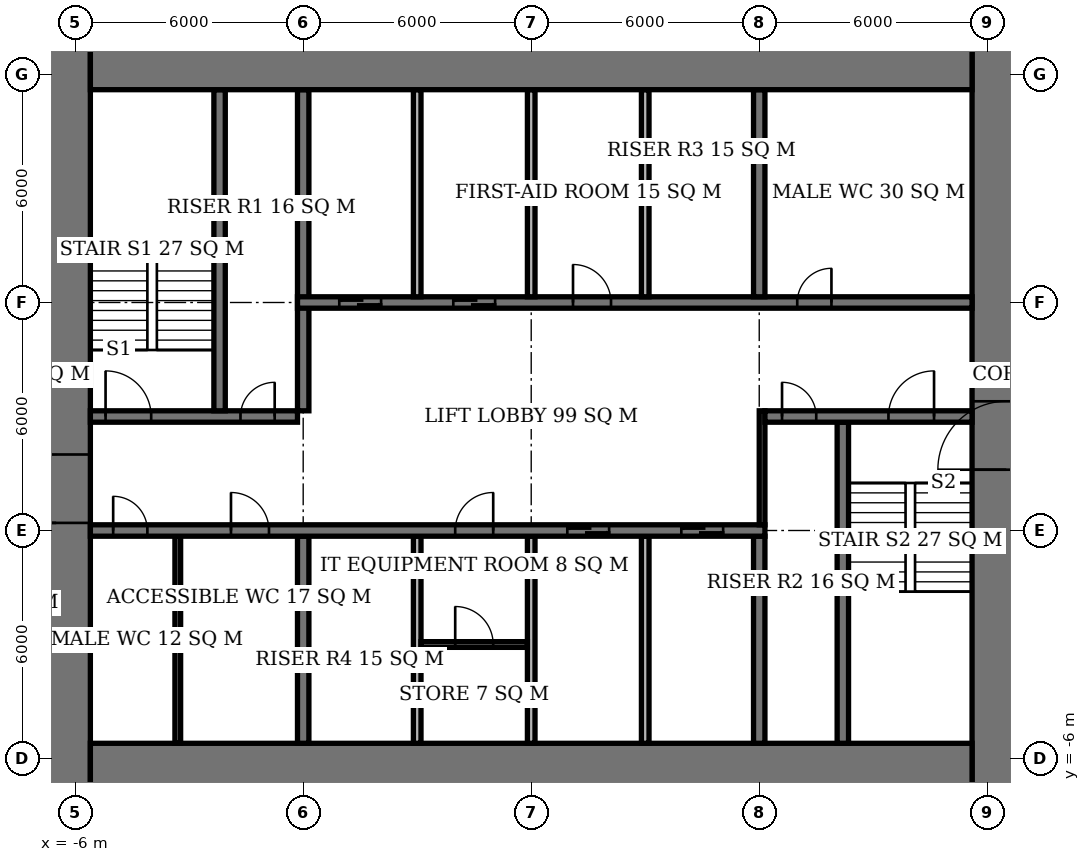
"""IFC4 building model, lengths in metres.
Left out: names, types, materials, properties, quantities, classifications, styles, units other than length and angle.
Written with IfcOpenShell. Run it as: python <this file> out.ifc"""

import sys

from ifc_helpers import new_model, si_unit, direction, frame, frame_2d, origin, place, context, subcontext, project, spatial, rectangle, extrude, element, fill, save


model = new_model("IFC4")
c1 = context("Model", 3, precision=1e-05, world=origin(), true_north=direction((0.0, 1.0)))
c2 = subcontext(c1, "Body", "Model", "MODEL_VIEW")
j1 = project(units=[si_unit("LENGTHUNIT", "METRE"), si_unit("PLANEANGLEUNIT", "RADIAN")], contexts=[c1])
p1 = place(None, origin())
s1 = spatial("IfcSite", under=j1, at=p1, CompositionType="ELEMENT")
p2 = place(p1, origin())
s2 = spatial("IfcBuilding", under=s1, at=p2, CompositionType="ELEMENT")
p3 = place(p2, frame((0.0, 0.0, 220.1)))
s3 = spatial("IfcBuildingStorey", under=s2, at=p3, CompositionType="ELEMENT", Elevation=220.1)
for number, where, z_axis, x_axis in (
    (1, (-5.6, -6.6, 0.0), (0.0, 0.0, 1.0), (1.0, 0.0, 0.0)),
    (2, (-5.6, 12.6, 0.0), (0.0, 0.0, 1.0), (1.0, 0.0, 0.0)),
):
    element("IfcWall", number, at=place(p3, frame(where, z_axis=z_axis, x_axis=x_axis)), inside=s3, PredefinedType="SHEAR", context=c2, shape_type="SweptSolid", body=[
        extrude(rectangle(XDim=23.2, YDim=2.0, at=frame_2d((11.6, 0.0))), origin(), (0.0, 0.0, 1.0), 3.9),
    ])
p4 = place(p3, frame((-6.5, -7.6, 0.0), z_axis=(0.0, 0.0, 1.0), x_axis=(0.0, 1.0, 0.0)))
e3 = element("IfcWall", 3, at=p4, inside=s3, PredefinedType="SHEAR", context=c2, shape_type="SweptSolid", body=[
    extrude(rectangle(XDim=21.2, YDim=1.8, at=frame_2d((10.6, 0.0))), origin(), (0.0, 0.0, 1.0), 3.9),
])
p5 = place(p4, frame((7.8, 0.0, 0.0)))
e4 = element("IfcOpeningElement", 4, at=p5, cuts=e3, PredefinedType="OPENING", context=c2, shape_type="SweptSolid", body=[
    extrude(rectangle(XDim=1.8, YDim=2.4, at=frame_2d((0.9, 1.2))), frame((0.0, 0.91, 0.0), z_axis=(0.0, -1.0, 0.0), x_axis=(1.0, 0.0, 0.0)), (0.0, 0.0, 1.0), 1.82),
])
p6 = place(p3, frame((18.5, -7.6, 0.0), z_axis=(0.0, 0.0, 1.0), x_axis=(0.0, 1.0, 0.0)))
e5 = element("IfcWall", 5, at=p6, inside=s3, PredefinedType="SHEAR", context=c2, shape_type="SweptSolid", body=[
    extrude(rectangle(XDim=21.2, YDim=1.8, at=frame_2d((10.6, 0.0))), origin(), (0.0, 0.0, 1.0), 3.9),
])
p7 = place(p6, frame((9.2, 0.0, 0.0)))
e6 = element("IfcOpeningElement", 6, at=p7, cuts=e5, PredefinedType="OPENING", context=c2, shape_type="SweptSolid", body=[
    extrude(rectangle(XDim=1.8, YDim=2.4, at=frame_2d((0.9, 1.2))), frame((0.0, 0.91, 0.0), z_axis=(0.0, -1.0, 0.0), x_axis=(1.0, 0.0, 0.0)), (0.0, 0.0, 1.0), 1.82),
])
p8 = place(p3, frame((-5.6, 0.0, 0.0), z_axis=(0.0, 0.0, 1.0), x_axis=(1.0, 0.0, 0.0)))
e7 = element("IfcWall", 7, at=p8, inside=s3, PredefinedType="SHEAR", context=c2, shape_type="SweptSolid", body=[
    extrude(rectangle(XDim=17.75, YDim=0.3, at=frame_2d((8.875, 0.0))), origin(), (0.0, 0.0, 1.0), 3.9),
])
p9 = place(p8, frame((0.6, 0.0, 0.0)))
e8 = element("IfcOpeningElement", 8, at=p9, cuts=e7, PredefinedType="OPENING", context=c2, shape_type="SweptSolid", body=[
    extrude(rectangle(XDim=0.9, YDim=2.1, at=frame_2d((0.45, 1.05))), frame((0.0, 0.16, 0.0), z_axis=(0.0, -1.0, 0.0), x_axis=(1.0, 0.0, 0.0)), (0.0, 0.0, 1.0), 0.32),
])
p10 = place(p8, frame((3.7, 0.0, 0.0)))
e9 = element("IfcOpeningElement", 9, at=p10, cuts=e7, PredefinedType="OPENING", context=c2, shape_type="SweptSolid", body=[
    extrude(rectangle(XDim=1.0, YDim=2.1, at=frame_2d((0.5, 1.05))), frame((0.0, 0.16, 0.0), z_axis=(0.0, -1.0, 0.0), x_axis=(1.0, 0.0, 0.0)), (0.0, 0.0, 1.0), 0.32),
])
p11 = place(p8, frame((9.6, 0.0, 0.0)))
e10 = element("IfcOpeningElement", 10, at=p11, cuts=e7, PredefinedType="OPENING", context=c2, shape_type="SweptSolid", body=[
    extrude(rectangle(XDim=1.0, YDim=2.1, at=frame_2d((0.5, 1.05))), frame((0.0, 0.16, 0.0), z_axis=(0.0, -1.0, 0.0), x_axis=(1.0, 0.0, 0.0)), (0.0, 0.0, 1.0), 0.32),
])
p12 = place(p8, frame((12.55, 0.0, 0.0)))
e11 = element("IfcOpeningElement", 11, at=p12, cuts=e7, PredefinedType="OPENING", context=c2, shape_type="SweptSolid", body=[
    extrude(rectangle(XDim=1.1, YDim=2.1, at=frame_2d((0.55, 1.05))), frame((0.0, 0.16, 0.0), z_axis=(0.0, -1.0, 0.0), x_axis=(1.0, 0.0, 0.0)), (0.0, 0.0, 1.0), 0.32),
])
p13 = place(p8, frame((15.55, 0.0, 0.0)))
e12 = element("IfcOpeningElement", 12, at=p13, cuts=e7, PredefinedType="OPENING", context=c2, shape_type="SweptSolid", body=[
    extrude(rectangle(XDim=1.1, YDim=2.1, at=frame_2d((0.55, 1.05))), frame((0.0, 0.16, 0.0), z_axis=(0.0, -1.0, 0.0), x_axis=(1.0, 0.0, 0.0)), (0.0, 0.0, 1.0), 0.32),
])
p14 = place(p3, frame((-5.6, 3.0, 0.0), z_axis=(0.0, 0.0, 1.0), x_axis=(1.0, 0.0, 0.0)))
e13 = element("IfcWall", 13, at=p14, inside=s3, PredefinedType="SHEAR", context=c2, shape_type="SweptSolid", body=[
    extrude(rectangle(XDim=5.45, YDim=0.3, at=frame_2d((2.725, 0.0))), origin(), (0.0, 0.0, 1.0), 3.9),
])
p15 = place(p14, frame((0.4, 0.0, 0.0)))
e14 = element("IfcOpeningElement", 14, at=p15, cuts=e13, PredefinedType="OPENING", context=c2, shape_type="SweptSolid", body=[
    extrude(rectangle(XDim=1.2, YDim=2.1, at=frame_2d((0.6, 1.05))), frame((0.0, 0.16, 0.0), z_axis=(0.0, -1.0, 0.0), x_axis=(1.0, 0.0, 0.0)), (0.0, 0.0, 1.0), 0.32),
])
p16 = place(p14, frame((3.95, 0.0, 0.0)))
e15 = element("IfcOpeningElement", 15, at=p16, cuts=e13, PredefinedType="OPENING", context=c2, shape_type="SweptSolid", body=[
    extrude(rectangle(XDim=0.9, YDim=2.1, at=frame_2d((0.45, 1.05))), frame((0.0, 0.16, 0.0), z_axis=(0.0, -1.0, 0.0), x_axis=(1.0, 0.0, 0.0)), (0.0, 0.0, 1.0), 0.32),
])
p17 = place(p3, frame((12.15, 3.0, 0.0), z_axis=(0.0, 0.0, 1.0), x_axis=(1.0, 0.0, 0.0)))
e16 = element("IfcWall", 16, at=p17, inside=s3, PredefinedType="SHEAR", context=c2, shape_type="SweptSolid", body=[
    extrude(rectangle(XDim=5.45, YDim=0.3, at=frame_2d((2.725, 0.0))), origin(), (0.0, 0.0, 1.0), 3.9),
])
p18 = place(p17, frame((3.25, 0.0, 0.0)))
e17 = element("IfcOpeningElement", 17, at=p18, cuts=e16, PredefinedType="OPENING", context=c2, shape_type="SweptSolid", body=[
    extrude(rectangle(XDim=1.2, YDim=2.1, at=frame_2d((0.6, 1.05))), frame((0.0, 0.16, 0.0), z_axis=(0.0, -1.0, 0.0), x_axis=(1.0, 0.0, 0.0)), (0.0, 0.0, 1.0), 0.32),
])
p19 = place(p17, frame((0.45, 0.0, 0.0)))
e18 = element("IfcOpeningElement", 18, at=p19, cuts=e16, PredefinedType="OPENING", context=c2, shape_type="SweptSolid", body=[
    extrude(rectangle(XDim=0.9, YDim=2.1, at=frame_2d((0.45, 1.05))), frame((0.0, 0.16, 0.0), z_axis=(0.0, -1.0, 0.0), x_axis=(1.0, 0.0, 0.0)), (0.0, 0.0, 1.0), 0.32),
])
p20 = place(p3, frame((-0.15, 6.0, 0.0), z_axis=(0.0, 0.0, 1.0), x_axis=(1.0, 0.0, 0.0)))
e19 = element("IfcWall", 19, at=p20, inside=s3, PredefinedType="SHEAR", context=c2, shape_type="SweptSolid", body=[
    extrude(rectangle(XDim=17.75, YDim=0.3, at=frame_2d((8.875, 0.0))), origin(), (0.0, 0.0, 1.0), 3.9),
])
p21 = place(p20, frame((13.15, 0.0, 0.0)))
e20 = element("IfcOpeningElement", 20, at=p21, cuts=e19, PredefinedType="OPENING", context=c2, shape_type="SweptSolid", body=[
    extrude(rectangle(XDim=0.9, YDim=2.1, at=frame_2d((0.45, 1.05))), frame((0.0, 0.16, 0.0), z_axis=(0.0, -1.0, 0.0), x_axis=(1.0, 0.0, 0.0)), (0.0, 0.0, 1.0), 0.32),
])
p22 = place(p20, frame((7.25, 0.0, 0.0)))
e21 = element("IfcOpeningElement", 21, at=p22, cuts=e19, PredefinedType="OPENING", context=c2, shape_type="SweptSolid", body=[
    extrude(rectangle(XDim=1.0, YDim=2.1, at=frame_2d((0.5, 1.05))), frame((0.0, 0.16, 0.0), z_axis=(0.0, -1.0, 0.0), x_axis=(1.0, 0.0, 0.0)), (0.0, 0.0, 1.0), 0.32),
])
p23 = place(p20, frame((1.1, 0.0, 0.0)))
e22 = element("IfcOpeningElement", 22, at=p23, cuts=e19, PredefinedType="OPENING", context=c2, shape_type="SweptSolid", body=[
    extrude(rectangle(XDim=1.1, YDim=2.1, at=frame_2d((0.55, 1.05))), frame((0.0, 0.16, 0.0), z_axis=(0.0, -1.0, 0.0), x_axis=(1.0, 0.0, 0.0)), (0.0, 0.0, 1.0), 0.32),
])
p24 = place(p20, frame((4.1, 0.0, 0.0)))
e23 = element("IfcOpeningElement", 23, at=p24, cuts=e19, PredefinedType="OPENING", context=c2, shape_type="SweptSolid", body=[
    extrude(rectangle(XDim=1.1, YDim=2.1, at=frame_2d((0.55, 1.05))), frame((0.0, 0.16, 0.0), z_axis=(0.0, -1.0, 0.0), x_axis=(1.0, 0.0, 0.0)), (0.0, 0.0, 1.0), 0.32),
])
p25 = place(p3, frame((0.0, -5.6, 0.0), z_axis=(0.0, 0.0, 1.0), x_axis=(0.0, 1.0, 0.0)))
e24 = element("IfcWall", 24, at=p25, inside=s3, PredefinedType="SHEAR", context=c2, shape_type="SweptSolid", body=[
    extrude(rectangle(XDim=5.45, YDim=0.3, at=frame_2d((2.725, 0.0))), origin(), (0.0, 0.0, 1.0), 3.9),
])
p26 = place(p3, frame((0.0, 3.15, 0.0), z_axis=(0.0, 0.0, 1.0), x_axis=(0.0, 1.0, 0.0)))
e25 = element("IfcWall", 25, at=p26, inside=s3, PredefinedType="SHEAR", context=c2, shape_type="SweptSolid", body=[
    extrude(rectangle(XDim=8.45, YDim=0.3, at=frame_2d((4.225, 0.0))), origin(), (0.0, 0.0, 1.0), 3.9),
])
for number, where, z_axis, x_axis in (
    (26, (12.0, -5.6, 0.0), (0.0, 0.0, 1.0), (0.0, 1.0, 0.0)),
    (27, (12.0, 6.15, 0.0), (0.0, 0.0, 1.0), (0.0, 1.0, 0.0)),
):
    element("IfcWall", number, at=place(p3, frame(where, z_axis=z_axis, x_axis=x_axis)), inside=s3, PredefinedType="SHEAR", context=c2, shape_type="SweptSolid", body=[
        extrude(rectangle(XDim=5.45, YDim=0.3, at=frame_2d((2.725, 0.0))), origin(), (0.0, 0.0, 1.0), 3.9),
    ])
for number, where, z_axis, x_axis in (
    (28, (-2.2, 3.15, 0.0), (0.0, 0.0, 1.0), (0.0, 1.0, 0.0)),
    (29, (14.2, -5.6, 0.0), (0.0, 0.0, 1.0), (0.0, 1.0, 0.0)),
):
    element("IfcWall", number, at=place(p3, frame(where, z_axis=z_axis, x_axis=x_axis)), inside=s3, PredefinedType="SHEAR", context=c2, shape_type="SweptSolid", body=[
        extrude(rectangle(XDim=8.45, YDim=0.3, at=frame_2d((4.225, 0.0))), origin(), (0.0, 0.0, 1.0), 3.9),
    ])
for number, where, z_axis, x_axis in (
    (30, (3.0, 6.15, 0.0), (0.0, 0.0, 1.0), (0.0, 1.0, 0.0)),
    (31, (6.0, 6.15, 0.0), (0.0, 0.0, 1.0), (0.0, 1.0, 0.0)),
    (32, (9.0, 6.15, 0.0), (0.0, 0.0, 1.0), (0.0, 1.0, 0.0)),
    (33, (3.0, -5.6, 0.0), (0.0, 0.0, 1.0), (0.0, 1.0, 0.0)),
    (34, (6.0, -5.6, 0.0), (0.0, 0.0, 1.0), (0.0, 1.0, 0.0)),
    (35, (9.0, -5.6, 0.0), (0.0, 0.0, 1.0), (0.0, 1.0, 0.0)),
):
    element("IfcWall", number, at=place(p3, frame(where, z_axis=z_axis, x_axis=x_axis)), inside=s3, PredefinedType="SOLIDWALL", context=c2, shape_type="SweptSolid", body=[
        extrude(rectangle(XDim=5.45, YDim=0.2, at=frame_2d((2.725, 0.0))), origin(), (0.0, 0.0, 1.0), 3.9),
    ])
p27 = place(p3, frame((-3.3, -5.6, 0.0), z_axis=(0.0, 0.0, 1.0), x_axis=(0.0, 1.0, 0.0)))
e36 = element("IfcWall", 36, at=p27, inside=s3, PredefinedType="PLUMBINGWALL", context=c2, shape_type="SweptSolid", body=[
    extrude(rectangle(XDim=5.45, YDim=0.15, at=frame_2d((2.725, 0.0))), origin(), (0.0, 0.0, 1.0), 3.65),
])
p28 = place(p3, frame((3.1, -3.0, 0.0), z_axis=(0.0, 0.0, 1.0), x_axis=(1.0, 0.0, 0.0)))
e37 = element("IfcWall", 37, at=p28, inside=s3, PredefinedType="PARTITIONING", context=c2, shape_type="SweptSolid", body=[
    extrude(rectangle(XDim=2.8, YDim=0.15, at=frame_2d((1.4, 0.0))), origin(), (0.0, 0.0, 1.0), 3.65),
])
p29 = place(p28, frame((0.9, 0.0, 0.0)))
e38 = element("IfcOpeningElement", 38, at=p29, cuts=e37, PredefinedType="OPENING", context=c2, shape_type="SweptSolid", body=[
    extrude(rectangle(XDim=1.0, YDim=2.1, at=frame_2d((0.5, 1.05))), frame((0.0, 0.085, 0.0), z_axis=(0.0, -1.0, 0.0), x_axis=(1.0, 0.0, 0.0)), (0.0, 0.0, 1.0), 0.17),
])
p30 = place(p3, frame((12.075, 0.15, 0.0), z_axis=(0.0, 0.0, 1.0), x_axis=(0.0, 1.0, 0.0)))
e39 = element("IfcWall", 39, at=p30, inside=s3, PredefinedType="PARTITIONING", context=c2, shape_type="SweptSolid", body=[
    extrude(rectangle(XDim=3.0, YDim=0.15, at=frame_2d((1.5, 0.0))), origin(), (0.0, 0.0, 1.0), 3.65),
])
p31 = place(p5, origin())
e40 = element("IfcDoor", 40, at=p31, inside=s3, OperationType="DOUBLE_DOOR_SINGLE_SWING", PredefinedType="DOOR", context=c2, shape_type="SweptSolid", body=[
    extrude(rectangle(XDim=1.8, YDim=2.4, at=frame_2d((0.9, 1.2))), frame((0.0, 0.025, 0.0), z_axis=(0.0, -1.0, 0.0), x_axis=(1.0, 0.0, 0.0)), (0.0, 0.0, 1.0), 0.05),
])
fill(e4, e40)
p32 = place(p7, origin())
e41 = element("IfcDoor", 41, at=p32, inside=s3, OperationType="DOUBLE_DOOR_SINGLE_SWING", PredefinedType="DOOR", context=c2, shape_type="SweptSolid", body=[
    extrude(rectangle(XDim=1.8, YDim=2.4, at=frame_2d((0.9, 1.2))), frame((0.0, 0.025, 0.0), z_axis=(0.0, -1.0, 0.0), x_axis=(1.0, 0.0, 0.0)), (0.0, 0.0, 1.0), 0.05),
])
fill(e6, e41)
p33 = place(p15, origin())
e42 = element("IfcDoor", 42, at=p33, inside=s3, OperationType="SINGLE_SWING_LEFT", PredefinedType="DOOR", context=c2, shape_type="SweptSolid", body=[
    extrude(rectangle(XDim=1.2, YDim=2.1, at=frame_2d((0.6, 1.05))), frame((0.0, 0.025, 0.0), z_axis=(0.0, -1.0, 0.0), x_axis=(1.0, 0.0, 0.0)), (0.0, 0.0, 1.0), 0.05),
])
fill(e14, e42)
p34 = place(p16, origin())
e43 = element("IfcDoor", 43, at=p34, inside=s3, OperationType="SINGLE_SWING_RIGHT", PredefinedType="DOOR", context=c2, shape_type="SweptSolid", body=[
    extrude(rectangle(XDim=0.9, YDim=2.1, at=frame_2d((0.45, 1.05))), frame((0.0, 0.025, 0.0), z_axis=(0.0, -1.0, 0.0), x_axis=(1.0, 0.0, 0.0)), (0.0, 0.0, 1.0), 0.05),
])
fill(e15, e43)
p35 = place(p18, origin())
e44 = element("IfcDoor", 44, at=p35, inside=s3, OperationType="SINGLE_SWING_RIGHT", PredefinedType="DOOR", context=c2, shape_type="SweptSolid", body=[
    extrude(rectangle(XDim=1.2, YDim=2.1, at=frame_2d((0.6, 1.05))), frame((0.0, 0.025, 0.0), z_axis=(0.0, -1.0, 0.0), x_axis=(1.0, 0.0, 0.0)), (0.0, 0.0, 1.0), 0.05),
])
fill(e17, e44)
p36 = place(p19, origin())
e45 = element("IfcDoor", 45, at=p36, inside=s3, OperationType="SINGLE_SWING_LEFT", PredefinedType="DOOR", context=c2, shape_type="SweptSolid", body=[
    extrude(rectangle(XDim=0.9, YDim=2.1, at=frame_2d((0.45, 1.05))), frame((0.0, 0.025, 0.0), z_axis=(0.0, -1.0, 0.0), x_axis=(1.0, 0.0, 0.0)), (0.0, 0.0, 1.0), 0.05),
])
fill(e18, e45)
p37 = place(p9, origin())
e46 = element("IfcDoor", 46, at=p37, inside=s3, OperationType="SINGLE_SWING_LEFT", PredefinedType="DOOR", context=c2, shape_type="SweptSolid", body=[
    extrude(rectangle(XDim=0.9, YDim=2.1, at=frame_2d((0.45, 1.05))), frame((0.0, 0.025, 0.0), z_axis=(0.0, -1.0, 0.0), x_axis=(1.0, 0.0, 0.0)), (0.0, 0.0, 1.0), 0.05),
])
fill(e8, e46)
p38 = place(p10, origin())
e47 = element("IfcDoor", 47, at=p38, inside=s3, OperationType="SINGLE_SWING_LEFT", PredefinedType="DOOR", context=c2, shape_type="SweptSolid", body=[
    extrude(rectangle(XDim=1.0, YDim=2.1, at=frame_2d((0.5, 1.05))), frame((0.0, 0.025, 0.0), z_axis=(0.0, -1.0, 0.0), x_axis=(1.0, 0.0, 0.0)), (0.0, 0.0, 1.0), 0.05),
])
fill(e9, e47)
p39 = place(p21, origin())
e48 = element("IfcDoor", 48, at=p39, inside=s3, OperationType="SINGLE_SWING_RIGHT", PredefinedType="DOOR", context=c2, shape_type="SweptSolid", body=[
    extrude(rectangle(XDim=0.9, YDim=2.1, at=frame_2d((0.45, 1.05))), frame((0.0, 0.025, 0.0), z_axis=(0.0, -1.0, 0.0), x_axis=(1.0, 0.0, 0.0)), (0.0, 0.0, 1.0), 0.05),
])
fill(e20, e48)
p40 = place(p22, origin())
e49 = element("IfcDoor", 49, at=p40, inside=s3, OperationType="SINGLE_SWING_LEFT", PredefinedType="DOOR", context=c2, shape_type="SweptSolid", body=[
    extrude(rectangle(XDim=1.0, YDim=2.1, at=frame_2d((0.5, 1.05))), frame((0.0, 0.025, 0.0), z_axis=(0.0, -1.0, 0.0), x_axis=(1.0, 0.0, 0.0)), (0.0, 0.0, 1.0), 0.05),
])
fill(e21, e49)
p41 = place(p29, origin())
e50 = element("IfcDoor", 50, at=p41, inside=s3, OperationType="SINGLE_SWING_LEFT", PredefinedType="DOOR", context=c2, shape_type="SweptSolid", body=[
    extrude(rectangle(XDim=1.0, YDim=2.1, at=frame_2d((0.5, 1.05))), frame((0.0, 0.025, 0.0), z_axis=(0.0, -1.0, 0.0), x_axis=(1.0, 0.0, 0.0)), (0.0, 0.0, 1.0), 0.05),
])
fill(e38, e50)
p42 = place(p11, origin())
e51 = element("IfcDoor", 51, at=p42, inside=s3, OperationType="SINGLE_SWING_RIGHT", PredefinedType="DOOR", context=c2, shape_type="SweptSolid", body=[
    extrude(rectangle(XDim=1.0, YDim=2.1, at=frame_2d((0.5, 1.05))), frame((0.0, 0.025, 0.0), z_axis=(0.0, -1.0, 0.0), x_axis=(1.0, 0.0, 0.0)), (0.0, 0.0, 1.0), 0.05),
])
fill(e10, e51)
p43 = place(p23, origin())
e52 = element("IfcDoor", 52, at=p43, inside=s3, OperationType="DOUBLE_DOOR_SLIDING", PredefinedType="USERDEFINED", context=c2, shape_type="SweptSolid", body=[
    extrude(rectangle(XDim=1.1, YDim=2.1, at=frame_2d((0.55, 1.05))), frame((0.0, 0.025, 0.0), z_axis=(0.0, -1.0, 0.0), x_axis=(1.0, 0.0, 0.0)), (0.0, 0.0, 1.0), 0.05),
])
fill(e22, e52)
p44 = place(p24, origin())
e53 = element("IfcDoor", 53, at=p44, inside=s3, OperationType="DOUBLE_DOOR_SLIDING", PredefinedType="USERDEFINED", context=c2, shape_type="SweptSolid", body=[
    extrude(rectangle(XDim=1.1, YDim=2.1, at=frame_2d((0.55, 1.05))), frame((0.0, 0.025, 0.0), z_axis=(0.0, -1.0, 0.0), x_axis=(1.0, 0.0, 0.0)), (0.0, 0.0, 1.0), 0.05),
])
fill(e23, e53)
p45 = place(p12, origin())
e54 = element("IfcDoor", 54, at=p45, inside=s3, OperationType="DOUBLE_DOOR_SLIDING", PredefinedType="USERDEFINED", context=c2, shape_type="SweptSolid", body=[
    extrude(rectangle(XDim=1.1, YDim=2.1, at=frame_2d((0.55, 1.05))), frame((0.0, 0.025, 0.0), z_axis=(0.0, -1.0, 0.0), x_axis=(1.0, 0.0, 0.0)), (0.0, 0.0, 1.0), 0.05),
])
fill(e11, e54)
p46 = place(p13, origin())
e55 = element("IfcDoor", 55, at=p46, inside=s3, OperationType="DOUBLE_DOOR_SLIDING", PredefinedType="USERDEFINED", context=c2, shape_type="SweptSolid", body=[
    extrude(rectangle(XDim=1.1, YDim=2.1, at=frame_2d((0.55, 1.05))), frame((0.0, 0.025, 0.0), z_axis=(0.0, -1.0, 0.0), x_axis=(1.0, 0.0, 0.0)), (0.0, 0.0, 1.0), 0.05),
])
fill(e12, e55)
save(model, sys.argv[1])
